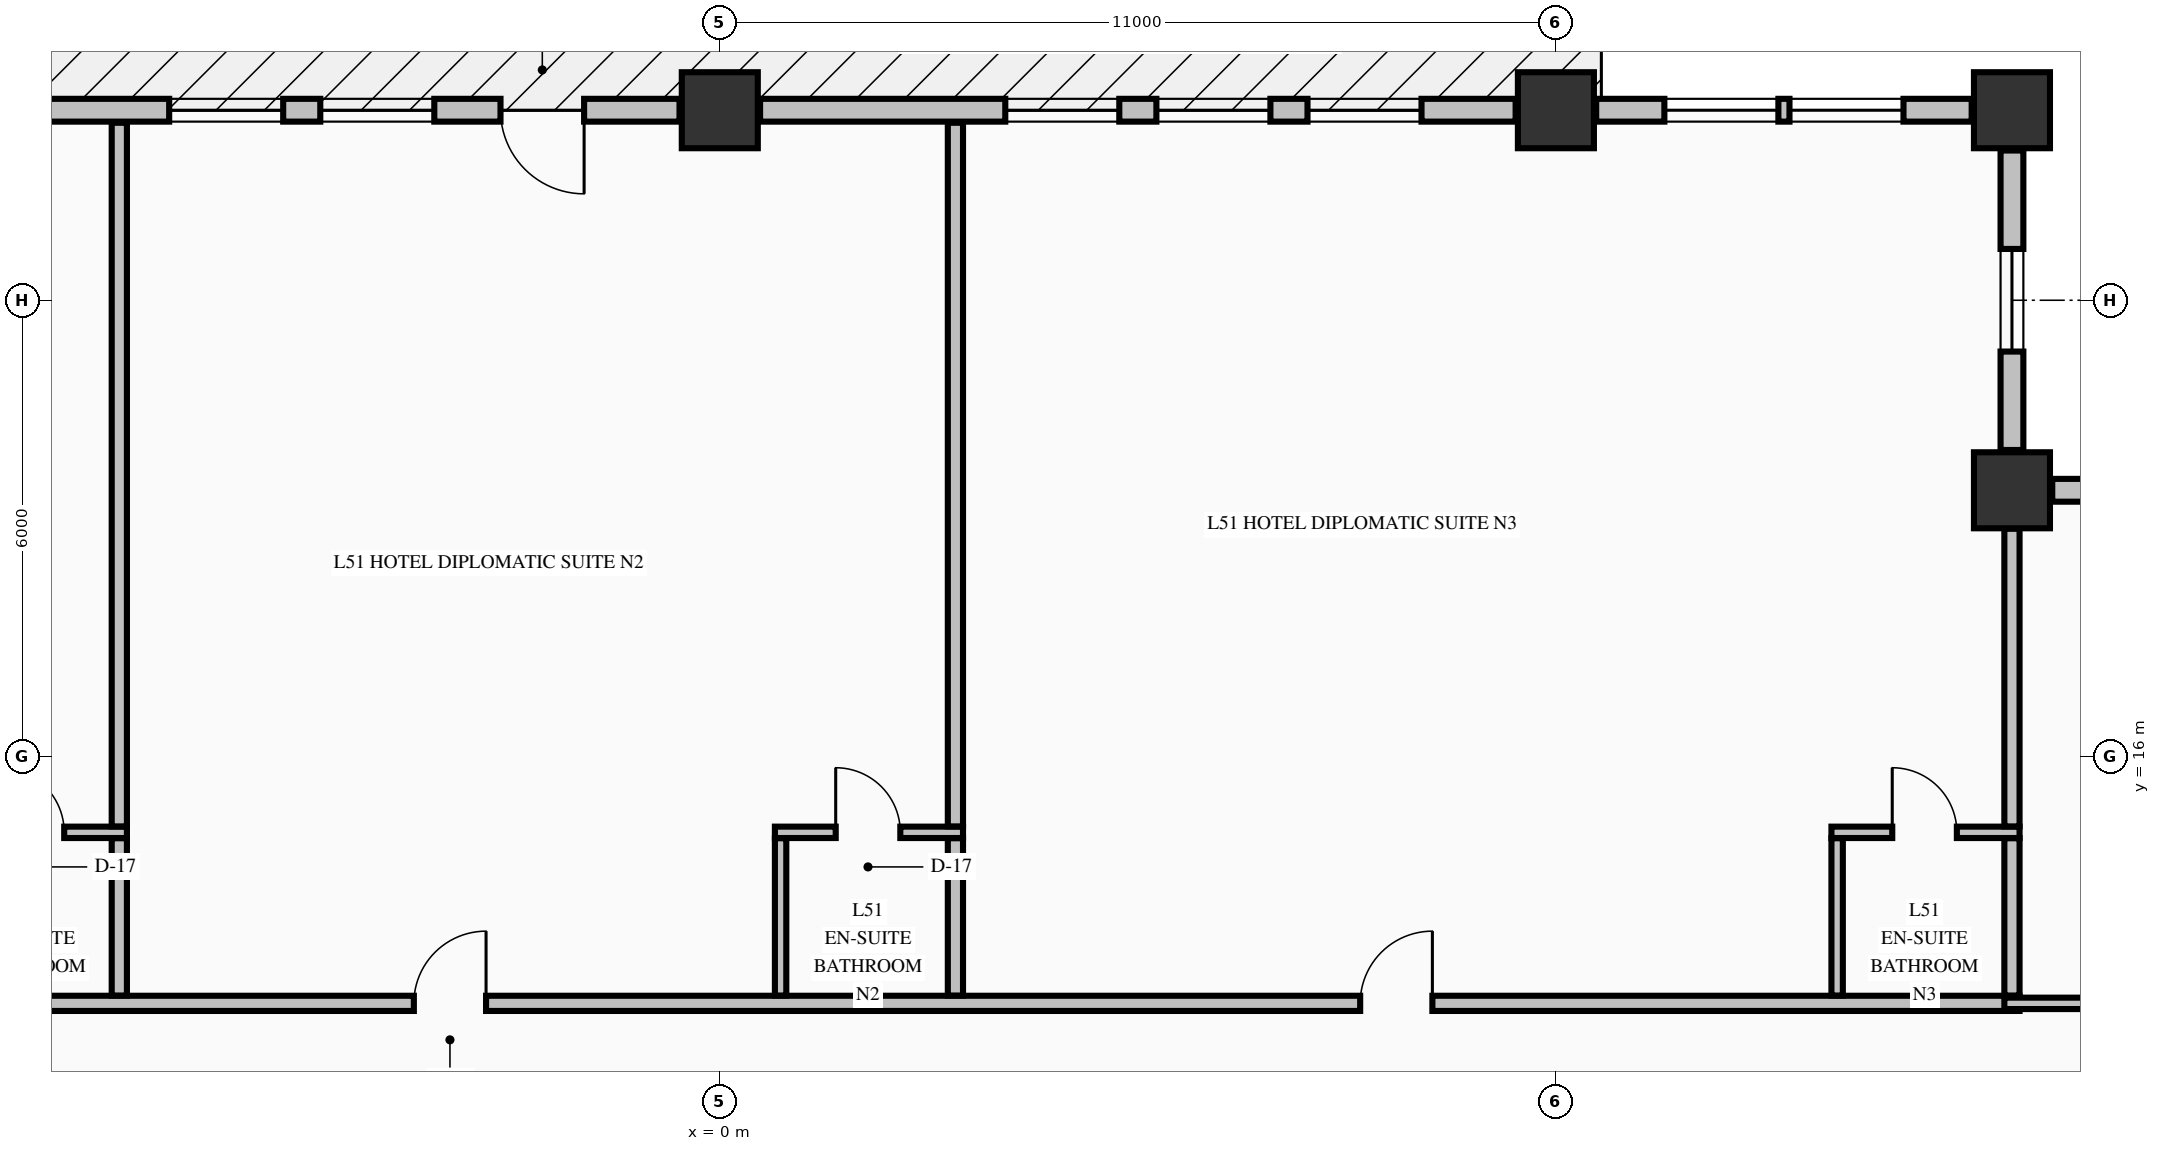
"""IFC4 building model, lengths in metres.
Left out: names, types, materials, properties, quantities, classifications, styles, units other than length and angle.
Written with IfcOpenShell. Run it as: python <this file> out.ifc"""

import sys

from ifc_helpers import new_model, si_unit, direction, frame, frame_2d, origin, origin_2d, place, context, subcontext, project, spatial, rectangle, extrude, element, fill, save


model = new_model("IFC4")
c1 = context("Model", 3, precision=1e-05, world=origin(), true_north=direction((0.0, 1.0)))
c2 = subcontext(c1, "Body", "Model", "MODEL_VIEW")
j1 = project(units=[si_unit("LENGTHUNIT", "METRE"), si_unit("PLANEANGLEUNIT", "RADIAN")], contexts=[c1])
p1 = place(None, origin())
s1 = spatial("IfcSite", under=j1, at=p1, CompositionType="ELEMENT")
p2 = place(p1, origin())
s2 = spatial("IfcBuilding", under=s1, at=p2, CompositionType="ELEMENT")
p3 = place(p2, frame((0.0, 0.0, 198.26)))
s3 = spatial("IfcBuildingStorey", under=s2, at=p3, CompositionType="ELEMENT", Elevation=198.26)
for number, where, z_axis, x_axis in (
    (1, (0.0, 24.5, -0.25), (0.0, 0.0, 1.0), (1.0, 0.0, 0.0)),
    (2, (11.0, 24.5, -0.25), (0.0, 0.0, 1.0), (1.0, 0.0, 0.0)),
    (3, (17.0, 24.5, -0.25), (0.0, 0.0, 1.0), (1.0, 0.0, 0.0)),
    (4, (17.0, 19.5, -0.25), (0.0, 0.0, 1.0), (1.0, 0.0, 0.0)),
):
    element("IfcColumn", number, at=place(p3, frame(where, z_axis=z_axis, x_axis=x_axis)), inside=s3, PredefinedType="COLUMN", context=c2, shape_type="SweptSolid", body=[
        extrude(rectangle(XDim=1.0, YDim=1.0, at=origin_2d()), origin(), (0.0, 0.0, 1.0), 3.4),
    ])
p4 = place(p3, frame((21.47, 19.5, 0.0), z_axis=(0.0, 0.0, 1.0), x_axis=(-1.0, 0.0, 0.0)))
e5 = element("IfcWall", 5, at=p4, inside=s3, PredefinedType="STANDARD", context=c2, shape_type="SweptSolid", body=[
    extrude(rectangle(XDim=3.94, YDim=0.3, at=frame_2d((1.97, 0.0))), origin(), (0.0, 0.0, 1.0), 2.542),
])
p5 = place(p4, frame((1.295, 0.0, 0.68)))
e6 = element("IfcOpeningElement", 6, at=p5, cuts=e5, PredefinedType="OPENING", context=c2, shape_type="SweptSolid", body=[
    extrude(rectangle(XDim=1.35, YDim=1.42, at=frame_2d((0.675, 0.71))), frame((0.0, 0.16, 0.0), z_axis=(0.0, -1.0, 0.0), x_axis=(1.0, 0.0, 0.0)), (0.0, 0.0, 1.0), 0.32),
])
p6 = place(p3, frame((17.0, 20.03, 0.0), z_axis=(0.0, 0.0, 1.0), x_axis=(0.0, 1.0, 0.0)))
e7 = element("IfcWall", 7, at=p6, inside=s3, PredefinedType="STANDARD", context=c2, shape_type="SweptSolid", body=[
    extrude(rectangle(XDim=3.94, YDim=0.3, at=frame_2d((1.97, 0.0))), origin(), (0.0, 0.0, 1.0), 2.542),
])
p7 = place(p6, frame((1.295, 0.0, 0.68)))
e8 = element("IfcOpeningElement", 8, at=p7, cuts=e7, PredefinedType="OPENING", context=c2, shape_type="SweptSolid", body=[
    extrude(rectangle(XDim=1.35, YDim=1.42, at=frame_2d((0.675, 0.71))), frame((0.0, 0.16, 0.0), z_axis=(0.0, -1.0, 0.0), x_axis=(1.0, 0.0, 0.0)), (0.0, 0.0, 1.0), 0.32),
])
p8 = place(p3, frame((-0.53, 24.5, 0.0), z_axis=(0.0, 0.0, 1.0), x_axis=(-1.0, 0.0, 0.0)))
e9 = element("IfcWall", 9, at=p8, inside=s3, PredefinedType="STANDARD", context=c2, shape_type="SweptSolid", body=[
    extrude(rectangle(XDim=9.94, YDim=0.3, at=frame_2d((4.97, 0.0))), origin(), (0.0, 0.0, 1.0), 2.542),
])
p9 = place(p8, frame((1.255, 0.0, 0.0)))
e10 = element("IfcOpeningElement", 10, at=p9, cuts=e9, PredefinedType="OPENING", context=c2, shape_type="SweptSolid", body=[
    extrude(rectangle(XDim=1.1, YDim=2.15, at=frame_2d((0.55, 1.075))), frame((0.0, 0.16, 0.0), z_axis=(0.0, -1.0, 0.0), x_axis=(1.0, 0.0, 0.0)), (0.0, 0.0, 1.0), 0.32),
])
p10 = place(p8, frame((3.226, 0.0, 0.72)))
e11 = element("IfcOpeningElement", 11, at=p10, cuts=e9, PredefinedType="OPENING", context=c2, shape_type="SweptSolid", body=[
    extrude(rectangle(XDim=1.5, YDim=1.6, at=frame_2d((0.75, 0.8))), frame((0.0, 0.16, 0.0), z_axis=(0.0, -1.0, 0.0), x_axis=(1.0, 0.0, 0.0)), (0.0, 0.0, 1.0), 0.32),
])
p11 = place(p8, frame((5.214, 0.0, 0.72)))
e12 = element("IfcOpeningElement", 12, at=p11, cuts=e9, PredefinedType="OPENING", context=c2, shape_type="SweptSolid", body=[
    extrude(rectangle(XDim=1.5, YDim=1.6, at=frame_2d((0.75, 0.8))), frame((0.0, 0.16, 0.0), z_axis=(0.0, -1.0, 0.0), x_axis=(1.0, 0.0, 0.0)), (0.0, 0.0, 1.0), 0.32),
])
p12 = place(p3, frame((10.47, 24.5, 0.0), z_axis=(0.0, 0.0, 1.0), x_axis=(-1.0, 0.0, 0.0)))
e13 = element("IfcWall", 13, at=p12, inside=s3, PredefinedType="STANDARD", context=c2, shape_type="SweptSolid", body=[
    extrude(rectangle(XDim=9.94, YDim=0.3, at=frame_2d((4.97, 0.0))), origin(), (0.0, 0.0, 1.0), 2.542),
])
p13 = place(p12, frame((1.238, 0.0, 0.72)))
e14 = element("IfcOpeningElement", 14, at=p13, cuts=e13, PredefinedType="OPENING", context=c2, shape_type="SweptSolid", body=[
    extrude(rectangle(XDim=1.5, YDim=1.6, at=frame_2d((0.75, 0.8))), frame((0.0, 0.16, 0.0), z_axis=(0.0, -1.0, 0.0), x_axis=(1.0, 0.0, 0.0)), (0.0, 0.0, 1.0), 0.32),
])
p14 = place(p12, frame((3.226, 0.0, 0.72)))
e15 = element("IfcOpeningElement", 15, at=p14, cuts=e13, PredefinedType="OPENING", context=c2, shape_type="SweptSolid", body=[
    extrude(rectangle(XDim=1.5, YDim=1.6, at=frame_2d((0.75, 0.8))), frame((0.0, 0.16, 0.0), z_axis=(0.0, -1.0, 0.0), x_axis=(1.0, 0.0, 0.0)), (0.0, 0.0, 1.0), 0.32),
])
p15 = place(p12, frame((5.214, 0.0, 0.72)))
e16 = element("IfcOpeningElement", 16, at=p15, cuts=e13, PredefinedType="OPENING", context=c2, shape_type="SweptSolid", body=[
    extrude(rectangle(XDim=1.5, YDim=1.6, at=frame_2d((0.75, 0.8))), frame((0.0, 0.16, 0.0), z_axis=(0.0, -1.0, 0.0), x_axis=(1.0, 0.0, 0.0)), (0.0, 0.0, 1.0), 0.32),
])
p16 = place(p3, frame((16.47, 24.5, 0.0), z_axis=(0.0, 0.0, 1.0), x_axis=(-1.0, 0.0, 0.0)))
e17 = element("IfcWall", 17, at=p16, inside=s3, PredefinedType="STANDARD", context=c2, shape_type="SweptSolid", body=[
    extrude(rectangle(XDim=4.94, YDim=0.3, at=frame_2d((2.47, 0.0))), origin(), (0.0, 0.0, 1.0), 2.542),
])
p17 = place(p16, frame((0.897, 0.0, 0.72)))
e18 = element("IfcOpeningElement", 18, at=p17, cuts=e17, PredefinedType="OPENING", context=c2, shape_type="SweptSolid", body=[
    extrude(rectangle(XDim=1.5, YDim=1.6, at=frame_2d((0.75, 0.8))), frame((0.0, 0.16, 0.0), z_axis=(0.0, -1.0, 0.0), x_axis=(1.0, 0.0, 0.0)), (0.0, 0.0, 1.0), 0.32),
])
p18 = place(p16, frame((2.543, 0.0, 0.72)))
e19 = element("IfcOpeningElement", 19, at=p18, cuts=e17, PredefinedType="OPENING", context=c2, shape_type="SweptSolid", body=[
    extrude(rectangle(XDim=1.5, YDim=1.6, at=frame_2d((0.75, 0.8))), frame((0.0, 0.16, 0.0), z_axis=(0.0, -1.0, 0.0), x_axis=(1.0, 0.0, 0.0)), (0.0, 0.0, 1.0), 0.32),
])
p19 = place(p3, frame((-22.1, 12.75, 0.0), z_axis=(0.0, 0.0, 1.0), x_axis=(1.0, 0.0, 0.0)))
e20 = element("IfcWall", 20, at=p19, inside=s3, PredefinedType="PARTITIONING", context=c2, shape_type="SweptSolid", body=[
    extrude(rectangle(XDim=39.2, YDim=0.2, at=frame_2d((19.6, 0.0))), origin(), (0.0, 0.0, 1.0), 3.15),
])
p20 = place(p19, frame((6.625, 0.0, 0.0)))
e21 = element("IfcOpeningElement", 21, at=p20, cuts=e20, PredefinedType="OPENING", context=c2, shape_type="SweptSolid", body=[
    extrude(rectangle(XDim=0.95, YDim=2.15, at=frame_2d((0.475, 1.075))), frame((0.0, 0.11, 0.0), z_axis=(0.0, -1.0, 0.0), x_axis=(1.0, 0.0, 0.0)), (0.0, 0.0, 1.0), 0.22),
])
p21 = place(p19, frame((18.075, 0.0, 0.0)))
e22 = element("IfcOpeningElement", 22, at=p21, cuts=e20, PredefinedType="OPENING", context=c2, shape_type="SweptSolid", body=[
    extrude(rectangle(XDim=0.95, YDim=2.15, at=frame_2d((0.475, 1.075))), frame((0.0, 0.11, 0.0), z_axis=(0.0, -1.0, 0.0), x_axis=(1.0, 0.0, 0.0)), (0.0, 0.0, 1.0), 0.22),
])
p22 = place(p19, frame((30.525, 0.0, 0.0)))
e23 = element("IfcOpeningElement", 23, at=p22, cuts=e20, PredefinedType="OPENING", context=c2, shape_type="SweptSolid", body=[
    extrude(rectangle(XDim=0.95, YDim=2.15, at=frame_2d((0.475, 1.075))), frame((0.0, 0.11, 0.0), z_axis=(0.0, -1.0, 0.0), x_axis=(1.0, 0.0, 0.0)), (0.0, 0.0, 1.0), 0.22),
])
p23 = place(p3, frame((16.9, 12.75, 0.0), z_axis=(0.0, 0.0, 1.0), x_axis=(1.0, 0.0, 0.0)))
e24 = element("IfcWall", 24, at=p23, inside=s3, PredefinedType="PARTITIONING", context=c2, shape_type="SweptSolid", body=[
    extrude(rectangle(XDim=3.175, YDim=0.15, at=frame_2d((1.587, 0.0))), origin(), (0.0, 0.0, 1.0), 3.15),
])
p24 = place(p3, frame((-10.275, 15.0, 0.0), z_axis=(0.0, 0.0, 1.0), x_axis=(1.0, 0.0, 0.0)))
e25 = element("IfcWall", 25, at=p24, inside=s3, PredefinedType="PARTITIONING", context=c2, shape_type="SweptSolid", body=[
    extrude(rectangle(XDim=2.475, YDim=0.15, at=frame_2d((1.237, 0.0))), origin(), (0.0, 0.0, 1.0), 3.15),
])
p25 = place(p24, frame((0.8, 0.0, 0.0)))
e26 = element("IfcOpeningElement", 26, at=p25, cuts=e25, PredefinedType="OPENING", context=c2, shape_type="SweptSolid", body=[
    extrude(rectangle(XDim=0.85, YDim=2.1, at=frame_2d((0.425, 1.05))), frame((0.0, 0.085, 0.0), z_axis=(0.0, -1.0, 0.0), x_axis=(1.0, 0.0, 0.0)), (0.0, 0.0, 1.0), 0.17),
])
p26 = place(p3, frame((0.725, 15.0, 0.0), z_axis=(0.0, 0.0, 1.0), x_axis=(1.0, 0.0, 0.0)))
e27 = element("IfcWall", 27, at=p26, inside=s3, PredefinedType="PARTITIONING", context=c2, shape_type="SweptSolid", body=[
    extrude(rectangle(XDim=2.475, YDim=0.15, at=frame_2d((1.237, 0.0))), origin(), (0.0, 0.0, 1.0), 3.15),
])
p27 = place(p26, frame((0.8, 0.0, 0.0)))
e28 = element("IfcOpeningElement", 28, at=p27, cuts=e27, PredefinedType="OPENING", context=c2, shape_type="SweptSolid", body=[
    extrude(rectangle(XDim=0.85, YDim=2.1, at=frame_2d((0.425, 1.05))), frame((0.0, 0.085, 0.0), z_axis=(0.0, -1.0, 0.0), x_axis=(1.0, 0.0, 0.0)), (0.0, 0.0, 1.0), 0.17),
])
p28 = place(p3, frame((14.625, 15.0, 0.0), z_axis=(0.0, 0.0, 1.0), x_axis=(1.0, 0.0, 0.0)))
e29 = element("IfcWall", 29, at=p28, inside=s3, PredefinedType="PARTITIONING", context=c2, shape_type="SweptSolid", body=[
    extrude(rectangle(XDim=2.475, YDim=0.15, at=frame_2d((1.238, 0.0))), origin(), (0.0, 0.0, 1.0), 3.15),
])
p29 = place(p28, frame((0.8, 0.0, 0.0)))
e30 = element("IfcOpeningElement", 30, at=p29, cuts=e29, PredefinedType="OPENING", context=c2, shape_type="SweptSolid", body=[
    extrude(rectangle(XDim=0.85, YDim=2.1, at=frame_2d((0.425, 1.05))), frame((0.0, 0.085, 0.0), z_axis=(0.0, -1.0, 0.0), x_axis=(1.0, 0.0, 0.0)), (0.0, 0.0, 1.0), 0.17),
])
p30 = place(p3, frame((-7.9, 12.853, 0.0), z_axis=(0.0, 0.0, 1.0), x_axis=(0.0, 1.0, 0.0)))
e31 = element("IfcWall", 31, at=p30, inside=s3, PredefinedType="PARTITIONING", context=c2, shape_type="SweptSolid", body=[
    extrude(rectangle(XDim=2.069, YDim=0.2, at=frame_2d((1.035, 0.0))), origin(), (0.0, 0.0, 1.0), 3.15),
])
p31 = place(p3, frame((-7.9, 15.078, 0.0), z_axis=(0.0, 0.0, 1.0), x_axis=(0.0, 1.0, 0.0)))
e32 = element("IfcWall", 32, at=p31, inside=s3, PredefinedType="PARTITIONING", context=c2, shape_type="SweptSolid", body=[
    extrude(rectangle(XDim=9.257, YDim=0.2, at=frame_2d((4.628, 0.0))), origin(), (0.0, 0.0, 1.0), 3.15),
])
p32 = place(p3, frame((0.8, 12.853, 0.0), z_axis=(0.0, 0.0, 1.0), x_axis=(0.0, 1.0, 0.0)))
e33 = element("IfcWall", 33, at=p32, inside=s3, PredefinedType="PARTITIONING", context=c2, shape_type="SweptSolid", body=[
    extrude(rectangle(XDim=2.069, YDim=0.15, at=frame_2d((1.035, 0.0))), origin(), (0.0, 0.0, 1.0), 3.15),
])
p33 = place(p3, frame((3.1, 12.853, 0.0), z_axis=(0.0, 0.0, 1.0), x_axis=(0.0, 1.0, 0.0)))
e34 = element("IfcWall", 34, at=p33, inside=s3, PredefinedType="PARTITIONING", context=c2, shape_type="SweptSolid", body=[
    extrude(rectangle(XDim=2.069, YDim=0.2, at=frame_2d((1.035, 0.0))), origin(), (0.0, 0.0, 1.0), 3.15),
])
p34 = place(p3, frame((3.1, 15.078, 0.0), z_axis=(0.0, 0.0, 1.0), x_axis=(0.0, 1.0, 0.0)))
e35 = element("IfcWall", 35, at=p34, inside=s3, PredefinedType="PARTITIONING", context=c2, shape_type="SweptSolid", body=[
    extrude(rectangle(XDim=9.257, YDim=0.2, at=frame_2d((4.628, 0.0))), origin(), (0.0, 0.0, 1.0), 3.15),
])
p35 = place(p3, frame((14.7, 12.853, 0.0), z_axis=(0.0, 0.0, 1.0), x_axis=(0.0, 1.0, 0.0)))
e36 = element("IfcWall", 36, at=p35, inside=s3, PredefinedType="PARTITIONING", context=c2, shape_type="SweptSolid", body=[
    extrude(rectangle(XDim=2.069, YDim=0.15, at=frame_2d((1.035, 0.0))), origin(), (0.0, 0.0, 1.0), 3.15),
])
p36 = place(p3, frame((17.0, 12.853, 0.0), z_axis=(0.0, 0.0, 1.0), x_axis=(0.0, 1.0, 0.0)))
e37 = element("IfcWall", 37, at=p36, inside=s3, PredefinedType="PARTITIONING", context=c2, shape_type="SweptSolid", body=[
    extrude(rectangle(XDim=2.069, YDim=0.2, at=frame_2d((1.035, 0.0))), origin(), (0.0, 0.0, 1.0), 3.15),
])
p37 = place(p3, frame((17.0, 15.078, 0.0), z_axis=(0.0, 0.0, 1.0), x_axis=(0.0, 1.0, 0.0)))
e38 = element("IfcWall", 38, at=p37, inside=s3, PredefinedType="PARTITIONING", context=c2, shape_type="SweptSolid", body=[
    extrude(rectangle(XDim=3.916, YDim=0.2, at=frame_2d((1.958, 0.0))), origin(), (0.0, 0.0, 1.0), 3.15),
])
p38 = place(p7, origin())
e39 = element("IfcWindow", 39, at=p38, inside=s3, PartitioningType="SINGLE_PANEL", PredefinedType="WINDOW", context=c2, shape_type="SweptSolid", body=[
    extrude(rectangle(XDim=1.35, YDim=1.42, at=frame_2d((0.675, 0.71))), frame((0.0, 0.03, 0.0), z_axis=(0.0, -1.0, 0.0), x_axis=(1.0, 0.0, 0.0)), (0.0, 0.0, 1.0), 0.06),
])
fill(e8, e39)
p39 = place(p9, origin())
e40 = element("IfcDoor", 40, at=p39, inside=s3, OperationType="SINGLE_SWING_LEFT", PredefinedType="DOOR", context=c2, shape_type="SweptSolid", body=[
    extrude(rectangle(XDim=1.1, YDim=2.15, at=frame_2d((0.55, 1.075))), frame((0.0, 0.025, 0.0), z_axis=(0.0, -1.0, 0.0), x_axis=(1.0, 0.0, 0.0)), (0.0, 0.0, 1.0), 0.05),
])
fill(e10, e40)
p40 = place(p10, origin())
e41 = element("IfcWindow", 41, at=p40, inside=s3, PartitioningType="SINGLE_PANEL", PredefinedType="WINDOW", context=c2, shape_type="SweptSolid", body=[
    extrude(rectangle(XDim=1.5, YDim=1.6, at=frame_2d((0.75, 0.8))), frame((0.0, 0.03, 0.0), z_axis=(0.0, -1.0, 0.0), x_axis=(1.0, 0.0, 0.0)), (0.0, 0.0, 1.0), 0.06),
])
fill(e11, e41)
p41 = place(p11, origin())
e42 = element("IfcWindow", 42, at=p41, inside=s3, PartitioningType="SINGLE_PANEL", PredefinedType="WINDOW", context=c2, shape_type="SweptSolid", body=[
    extrude(rectangle(XDim=1.5, YDim=1.6, at=frame_2d((0.75, 0.8))), frame((0.0, 0.03, 0.0), z_axis=(0.0, -1.0, 0.0), x_axis=(1.0, 0.0, 0.0)), (0.0, 0.0, 1.0), 0.06),
])
fill(e12, e42)
p42 = place(p13, origin())
e43 = element("IfcWindow", 43, at=p42, inside=s3, PartitioningType="SINGLE_PANEL", PredefinedType="WINDOW", context=c2, shape_type="SweptSolid", body=[
    extrude(rectangle(XDim=1.5, YDim=1.6, at=frame_2d((0.75, 0.8))), frame((0.0, 0.03, 0.0), z_axis=(0.0, -1.0, 0.0), x_axis=(1.0, 0.0, 0.0)), (0.0, 0.0, 1.0), 0.06),
])
fill(e14, e43)
p43 = place(p14, origin())
e44 = element("IfcWindow", 44, at=p43, inside=s3, PartitioningType="SINGLE_PANEL", PredefinedType="WINDOW", context=c2, shape_type="SweptSolid", body=[
    extrude(rectangle(XDim=1.5, YDim=1.6, at=frame_2d((0.75, 0.8))), frame((0.0, 0.03, 0.0), z_axis=(0.0, -1.0, 0.0), x_axis=(1.0, 0.0, 0.0)), (0.0, 0.0, 1.0), 0.06),
])
fill(e15, e44)
p44 = place(p15, origin())
e45 = element("IfcWindow", 45, at=p44, inside=s3, PartitioningType="SINGLE_PANEL", PredefinedType="WINDOW", context=c2, shape_type="SweptSolid", body=[
    extrude(rectangle(XDim=1.5, YDim=1.6, at=frame_2d((0.75, 0.8))), frame((0.0, 0.03, 0.0), z_axis=(0.0, -1.0, 0.0), x_axis=(1.0, 0.0, 0.0)), (0.0, 0.0, 1.0), 0.06),
])
fill(e16, e45)
p45 = place(p17, origin())
e46 = element("IfcWindow", 46, at=p45, inside=s3, PartitioningType="SINGLE_PANEL", PredefinedType="WINDOW", context=c2, shape_type="SweptSolid", body=[
    extrude(rectangle(XDim=1.5, YDim=1.6, at=frame_2d((0.75, 0.8))), frame((0.0, 0.03, 0.0), z_axis=(0.0, -1.0, 0.0), x_axis=(1.0, 0.0, 0.0)), (0.0, 0.0, 1.0), 0.06),
])
fill(e18, e46)
p46 = place(p18, origin())
e47 = element("IfcWindow", 47, at=p46, inside=s3, PartitioningType="SINGLE_PANEL", PredefinedType="WINDOW", context=c2, shape_type="SweptSolid", body=[
    extrude(rectangle(XDim=1.5, YDim=1.6, at=frame_2d((0.75, 0.8))), frame((0.0, 0.03, 0.0), z_axis=(0.0, -1.0, 0.0), x_axis=(1.0, 0.0, 0.0)), (0.0, 0.0, 1.0), 0.06),
])
fill(e19, e47)
p47 = place(p25, origin())
e48 = element("IfcDoor", 48, at=p47, inside=s3, OperationType="SINGLE_SWING_LEFT", PredefinedType="DOOR", context=c2, shape_type="SweptSolid", body=[
    extrude(rectangle(XDim=0.85, YDim=2.1, at=frame_2d((0.425, 1.05))), frame((0.0, 0.025, 0.0), z_axis=(0.0, -1.0, 0.0), x_axis=(1.0, 0.0, 0.0)), (0.0, 0.0, 1.0), 0.05),
])
fill(e26, e48)
p48 = place(p21, origin())
e49 = element("IfcDoor", 49, at=p48, inside=s3, OperationType="SINGLE_SWING_RIGHT", PredefinedType="DOOR", context=c2, shape_type="SweptSolid", body=[
    extrude(rectangle(XDim=0.95, YDim=2.15, at=frame_2d((0.475, 1.075))), frame((0.0, 0.025, 0.0), z_axis=(0.0, -1.0, 0.0), x_axis=(1.0, 0.0, 0.0)), (0.0, 0.0, 1.0), 0.05),
])
fill(e22, e49)
p49 = place(p27, origin())
e50 = element("IfcDoor", 50, at=p49, inside=s3, OperationType="SINGLE_SWING_LEFT", PredefinedType="DOOR", context=c2, shape_type="SweptSolid", body=[
    extrude(rectangle(XDim=0.85, YDim=2.1, at=frame_2d((0.425, 1.05))), frame((0.0, 0.025, 0.0), z_axis=(0.0, -1.0, 0.0), x_axis=(1.0, 0.0, 0.0)), (0.0, 0.0, 1.0), 0.05),
])
fill(e28, e50)
p50 = place(p22, origin())
e51 = element("IfcDoor", 51, at=p50, inside=s3, OperationType="SINGLE_SWING_RIGHT", PredefinedType="DOOR", context=c2, shape_type="SweptSolid", body=[
    extrude(rectangle(XDim=0.95, YDim=2.15, at=frame_2d((0.475, 1.075))), frame((0.0, 0.025, 0.0), z_axis=(0.0, -1.0, 0.0), x_axis=(1.0, 0.0, 0.0)), (0.0, 0.0, 1.0), 0.05),
])
fill(e23, e51)
p51 = place(p29, origin())
e52 = element("IfcDoor", 52, at=p51, inside=s3, OperationType="SINGLE_SWING_LEFT", PredefinedType="DOOR", context=c2, shape_type="SweptSolid", body=[
    extrude(rectangle(XDim=0.85, YDim=2.1, at=frame_2d((0.425, 1.05))), frame((0.0, 0.025, 0.0), z_axis=(0.0, -1.0, 0.0), x_axis=(1.0, 0.0, 0.0)), (0.0, 0.0, 1.0), 0.05),
])
fill(e30, e52)
save(model, sys.argv[1])
